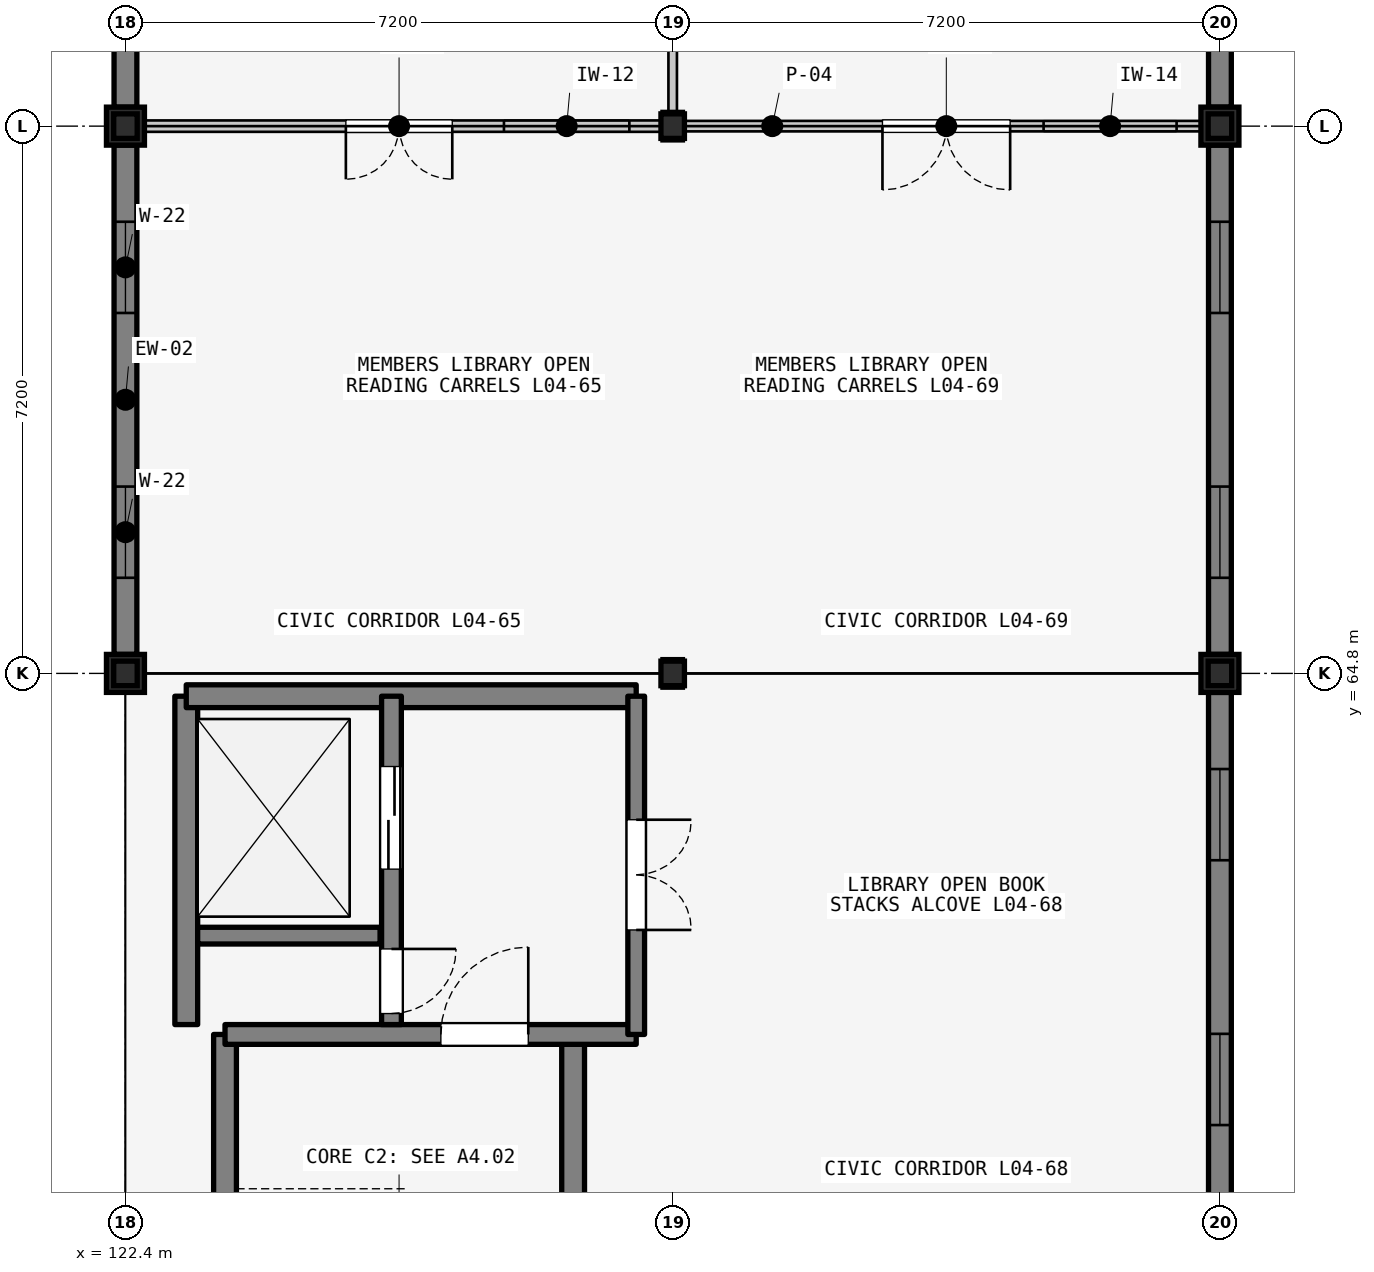
"""IFC4 building model, lengths in metres.
Left out: names, types, materials, properties, quantities, classifications, styles, units other than length and angle.
Written with IfcOpenShell. Run it as: python <this file> out.ifc"""

import sys

from ifc_helpers import new_model, si_unit, direction, frame, frame_2d, origin, origin_2d, place, context, subcontext, project, spatial, rectangle, i_section, extrude, element, fill, save


model = new_model("IFC4")
c1 = context("Model", 3, precision=1e-05, world=origin(), true_north=direction((0.0, 1.0)))
c2 = subcontext(c1, "Body", "Model", "MODEL_VIEW")
j1 = project(units=[si_unit("LENGTHUNIT", "METRE"), si_unit("PLANEANGLEUNIT", "RADIAN")], contexts=[c1])
p1 = place(None, origin())
s1 = spatial("IfcSite", under=j1, at=p1, CompositionType="ELEMENT")
p2 = place(p1, origin())
s2 = spatial("IfcBuilding", under=s1, at=p2, CompositionType="ELEMENT")
p3 = place(p2, frame((0.0, 0.0, 14.1)))
s3 = spatial("IfcBuildingStorey", under=s2, at=p3, CompositionType="ELEMENT", Elevation=14.1)
for number, where, z_axis, x_axis in (
    (1, (122.4, 64.8, 0.0), (0.0, 0.0, 1.0), (1.0, 0.0, 0.0)),
    (2, (122.4, 72.0, 0.0), (0.0, 0.0, 1.0), (1.0, 0.0, 0.0)),
):
    element("IfcColumn", number, at=place(p3, frame(where, z_axis=z_axis, x_axis=x_axis)), inside=s3, PredefinedType="COLUMN", context=c2, shape_type="SweptSolid", body=[
        extrude(rectangle(XDim=0.5, YDim=0.5, at=origin_2d()), origin(), (0.0, 0.0, 1.0), 3.9),
    ])
for number, where, z_axis, x_axis in (
    (3, (129.6, 64.8, 0.0), (0.0, 0.0, 1.0), (1.0, 0.0, 0.0)),
    (4, (129.6, 72.0, 0.0), (0.0, 0.0, 1.0), (1.0, 0.0, 0.0)),
):
    element("IfcColumn", number, at=place(p3, frame(where, z_axis=z_axis, x_axis=x_axis)), inside=s3, PredefinedType="COLUMN", context=c2, shape_type="SweptSolid", body=[
        extrude(i_section(OverallWidth=0.257, OverallDepth=0.363, WebThickness=0.013, FlangeThickness=0.022, FilletRadius=0.015, at=origin_2d()), origin(), (0.0, 0.0, 1.0), 3.9),
    ])
for number, where, z_axis, x_axis in (
    (5, (136.8, 64.8, 0.0), (0.0, 0.0, 1.0), (1.0, 0.0, 0.0)),
    (6, (136.8, 72.0, 0.0), (0.0, 0.0, 1.0), (1.0, 0.0, 0.0)),
):
    element("IfcColumn", number, at=place(p3, frame(where, z_axis=z_axis, x_axis=x_axis)), inside=s3, PredefinedType="COLUMN", context=c2, shape_type="SweptSolid", body=[
        extrude(rectangle(XDim=0.5, YDim=0.5, at=origin_2d()), origin(), (0.0, 0.0, 1.0), 3.9),
    ])
for number, where, z_axis, x_axis in (
    (7, (122.4, 64.8, 3.9), (0.0, 0.0, 1.0), (1.0, 0.0, 0.0)),
    (8, (129.6, 64.8, 3.9), (0.0, 0.0, 1.0), (1.0, 0.0, 0.0)),
    (9, (136.8, 64.8, 3.9), (0.0, 0.0, 1.0), (1.0, 0.0, 0.0)),
    (10, (122.4, 72.0, 3.9), (0.0, 0.0, 1.0), (1.0, 0.0, 0.0)),
    (11, (129.6, 72.0, 3.9), (0.0, 0.0, 1.0), (1.0, 0.0, 0.0)),
    (12, (136.8, 72.0, 3.9), (0.0, 0.0, 1.0), (1.0, 0.0, 0.0)),
):
    element("IfcColumn", number, at=place(p3, frame(where, z_axis=z_axis, x_axis=x_axis)), inside=s3, PredefinedType="COLUMN", context=c2, shape_type="SweptSolid", body=[
        extrude(i_section(OverallWidth=0.309, OverallDepth=0.323, WebThickness=0.014, FlangeThickness=0.023, FilletRadius=0.015, at=origin_2d()), origin(), (0.0, 0.0, 1.0), 2.22),
    ])
p4 = place(p3, frame((122.4, 65.05, 0.0), z_axis=(0.0, 0.0, 1.0), x_axis=(0.0, 1.0, 0.0)))
e13 = element("IfcWall", 13, at=p4, inside=s3, PredefinedType="SOLIDWALL", context=c2, shape_type="SweptSolid", body=[
    extrude(rectangle(XDim=6.7, YDim=0.3, at=frame_2d((3.35, 0.0))), origin(), (0.0, 0.0, 1.0), 3.2),
])
p5 = place(p4, frame((1.008, 0.0, 0.95)))
e14 = element("IfcOpeningElement", 14, at=p5, cuts=e13, PredefinedType="OPENING", context=c2, shape_type="SweptSolid", body=[
    extrude(rectangle(XDim=1.2, YDim=1.7, at=frame_2d((0.6, 0.85))), frame((0.0, 0.16, 0.0), z_axis=(0.0, -1.0, 0.0), x_axis=(1.0, 0.0, 0.0)), (0.0, 0.0, 1.0), 0.32),
])
p6 = place(p4, frame((4.492, 0.0, 0.95)))
e15 = element("IfcOpeningElement", 15, at=p6, cuts=e13, PredefinedType="OPENING", context=c2, shape_type="SweptSolid", body=[
    extrude(rectangle(XDim=1.2, YDim=1.7, at=frame_2d((0.6, 0.85))), frame((0.0, 0.16, 0.0), z_axis=(0.0, -1.0, 0.0), x_axis=(1.0, 0.0, 0.0)), (0.0, 0.0, 1.0), 0.32),
])
p7 = place(p3, frame((122.4, 72.25, 0.0), z_axis=(0.0, 0.0, 1.0), x_axis=(0.0, 1.0, 0.0)))
e16 = element("IfcWall", 16, at=p7, inside=s3, PredefinedType="SOLIDWALL", context=c2, shape_type="SweptSolid", body=[
    extrude(rectangle(XDim=6.7, YDim=0.3, at=frame_2d((3.35, 0.0))), origin(), (0.0, 0.0, 1.0), 3.2),
])
p8 = place(p7, frame((1.008, 0.0, 0.95)))
e17 = element("IfcOpeningElement", 17, at=p8, cuts=e16, PredefinedType="OPENING", context=c2, shape_type="SweptSolid", body=[
    extrude(rectangle(XDim=1.2, YDim=1.7, at=frame_2d((0.6, 0.85))), frame((0.0, 0.16, 0.0), z_axis=(0.0, -1.0, 0.0), x_axis=(1.0, 0.0, 0.0)), (0.0, 0.0, 1.0), 0.32),
])
p9 = place(p7, frame((4.492, 0.0, 0.95)))
e18 = element("IfcOpeningElement", 18, at=p9, cuts=e16, PredefinedType="OPENING", context=c2, shape_type="SweptSolid", body=[
    extrude(rectangle(XDim=1.2, YDim=1.7, at=frame_2d((0.6, 0.85))), frame((0.0, 0.16, 0.0), z_axis=(0.0, -1.0, 0.0), x_axis=(1.0, 0.0, 0.0)), (0.0, 0.0, 1.0), 0.32),
])
p10 = place(p3, frame((136.8, 64.55, 0.0), z_axis=(0.0, 0.0, 1.0), x_axis=(0.0, -1.0, 0.0)))
e19 = element("IfcWall", 19, at=p10, inside=s3, PredefinedType="SOLIDWALL", context=c2, shape_type="SweptSolid", body=[
    extrude(rectangle(XDim=6.7, YDim=0.3, at=frame_2d((3.35, 0.0))), origin(), (0.0, 0.0, 1.0), 3.2),
])
p11 = place(p10, frame((1.008, 0.0, 0.95)))
e20 = element("IfcOpeningElement", 20, at=p11, cuts=e19, PredefinedType="OPENING", context=c2, shape_type="SweptSolid", body=[
    extrude(rectangle(XDim=1.2, YDim=1.7, at=frame_2d((0.6, 0.85))), frame((0.0, 0.16, 0.0), z_axis=(0.0, -1.0, 0.0), x_axis=(1.0, 0.0, 0.0)), (0.0, 0.0, 1.0), 0.32),
])
p12 = place(p10, frame((4.492, 0.0, 0.95)))
e21 = element("IfcOpeningElement", 21, at=p12, cuts=e19, PredefinedType="OPENING", context=c2, shape_type="SweptSolid", body=[
    extrude(rectangle(XDim=1.2, YDim=1.7, at=frame_2d((0.6, 0.85))), frame((0.0, 0.16, 0.0), z_axis=(0.0, -1.0, 0.0), x_axis=(1.0, 0.0, 0.0)), (0.0, 0.0, 1.0), 0.32),
])
p13 = place(p3, frame((136.8, 71.75, 0.0), z_axis=(0.0, 0.0, 1.0), x_axis=(0.0, -1.0, 0.0)))
e22 = element("IfcWall", 22, at=p13, inside=s3, PredefinedType="SOLIDWALL", context=c2, shape_type="SweptSolid", body=[
    extrude(rectangle(XDim=6.7, YDim=0.3, at=frame_2d((3.35, 0.0))), origin(), (0.0, 0.0, 1.0), 3.2),
])
p14 = place(p13, frame((1.008, 0.0, 0.95)))
e23 = element("IfcOpeningElement", 23, at=p14, cuts=e22, PredefinedType="OPENING", context=c2, shape_type="SweptSolid", body=[
    extrude(rectangle(XDim=1.2, YDim=1.7, at=frame_2d((0.6, 0.85))), frame((0.0, 0.16, 0.0), z_axis=(0.0, -1.0, 0.0), x_axis=(1.0, 0.0, 0.0)), (0.0, 0.0, 1.0), 0.32),
])
p15 = place(p13, frame((4.492, 0.0, 0.95)))
e24 = element("IfcOpeningElement", 24, at=p15, cuts=e22, PredefinedType="OPENING", context=c2, shape_type="SweptSolid", body=[
    extrude(rectangle(XDim=1.2, YDim=1.7, at=frame_2d((0.6, 0.85))), frame((0.0, 0.16, 0.0), z_axis=(0.0, -1.0, 0.0), x_axis=(1.0, 0.0, 0.0)), (0.0, 0.0, 1.0), 0.32),
])
p16 = place(p3, frame((136.8, 78.95, 0.0), z_axis=(0.0, 0.0, 1.0), x_axis=(0.0, -1.0, 0.0)))
e25 = element("IfcWall", 25, at=p16, inside=s3, PredefinedType="SOLIDWALL", context=c2, shape_type="SweptSolid", body=[
    extrude(rectangle(XDim=6.7, YDim=0.3, at=frame_2d((3.35, 0.0))), origin(), (0.0, 0.0, 1.0), 3.2),
])
p17 = place(p16, frame((1.008, 0.0, 0.95)))
e26 = element("IfcOpeningElement", 26, at=p17, cuts=e25, PredefinedType="OPENING", context=c2, shape_type="SweptSolid", body=[
    extrude(rectangle(XDim=1.2, YDim=1.7, at=frame_2d((0.6, 0.85))), frame((0.0, 0.16, 0.0), z_axis=(0.0, -1.0, 0.0), x_axis=(1.0, 0.0, 0.0)), (0.0, 0.0, 1.0), 0.32),
])
p18 = place(p16, frame((4.492, 0.0, 0.95)))
e27 = element("IfcOpeningElement", 27, at=p18, cuts=e25, PredefinedType="OPENING", context=c2, shape_type="SweptSolid", body=[
    extrude(rectangle(XDim=1.2, YDim=1.7, at=frame_2d((0.6, 0.85))), frame((0.0, 0.16, 0.0), z_axis=(0.0, -1.0, 0.0), x_axis=(1.0, 0.0, 0.0)), (0.0, 0.0, 1.0), 0.32),
])
for number, where, z_axis, x_axis in (
    (28, (123.71, 50.75, 0.0), (0.0, 0.0, 1.0), (0.0, 1.0, 0.0)),
    (29, (128.29, 50.75, 0.0), (0.0, 0.0, 1.0), (0.0, 1.0, 0.0)),
):
    element("IfcWall", number, at=place(p3, frame(where, z_axis=z_axis, x_axis=x_axis)), inside=s3, PredefinedType="SHEAR", context=c2, shape_type="SweptSolid", body=[
        extrude(rectangle(XDim=9.3, YDim=0.3, at=frame_2d((4.65, 0.0))), origin(), (0.0, 0.0, 1.0), 3.72),
    ])
p19 = place(p3, frame((123.71, 60.05, 0.0), z_axis=(0.0, 0.0, 1.0), x_axis=(1.0, 0.0, 0.0)))
e30 = element("IfcWall", 30, at=p19, inside=s3, PredefinedType="SHEAR", context=c2, shape_type="SweptSolid", body=[
    extrude(rectangle(XDim=5.41, YDim=0.26, at=frame_2d((2.705, 0.0))), origin(), (0.0, 0.0, 1.0), 3.72),
])
p20 = place(p19, frame((2.84, 0.0, 0.0)))
e31 = element("IfcOpeningElement", 31, at=p20, cuts=e30, PredefinedType="OPENING", context=c2, shape_type="SweptSolid", body=[
    extrude(rectangle(XDim=1.15, YDim=2.15, at=frame_2d((0.575, 1.075))), frame((0.0, 0.14, 0.0), z_axis=(0.0, -1.0, 0.0), x_axis=(1.0, 0.0, 0.0)), (0.0, 0.0, 1.0), 0.28),
])
p21 = place(p3, frame((123.2, 60.18, 0.0), z_axis=(0.0, 0.0, 1.0), x_axis=(0.0, 1.0, 0.0)))
e32 = element("IfcWall", 32, at=p21, inside=s3, PredefinedType="SHEAR", context=c2, shape_type="SweptSolid", body=[
    extrude(rectangle(XDim=4.32, YDim=0.3, at=frame_2d((2.16, 0.0))), origin(), (0.0, 0.0, 1.0), 3.72),
])
p22 = place(p3, frame((123.2, 64.5, 0.0), z_axis=(0.0, 0.0, 1.0), x_axis=(1.0, 0.0, 0.0)))
e33 = element("IfcWall", 33, at=p22, inside=s3, PredefinedType="SHEAR", context=c2, shape_type="SweptSolid", body=[
    extrude(rectangle(XDim=5.92, YDim=0.3, at=frame_2d((2.96, 0.0))), origin(), (0.0, 0.0, 1.0), 3.72),
])
p23 = place(p3, frame((123.35, 61.35, 0.0), z_axis=(0.0, 0.0, 1.0), x_axis=(1.0, 0.0, 0.0)))
e34 = element("IfcWall", 34, at=p23, inside=s3, PredefinedType="SHEAR", context=c2, shape_type="SweptSolid", body=[
    extrude(rectangle(XDim=2.4, YDim=0.22, at=frame_2d((1.2, 0.0))), origin(), (0.0, 0.0, 1.0), 3.72),
])
p24 = place(p3, frame((125.9, 64.5, 0.0), z_axis=(0.0, 0.0, 1.0), x_axis=(0.0, -1.0, 0.0)))
e35 = element("IfcWall", 35, at=p24, inside=s3, PredefinedType="SHEAR", context=c2, shape_type="SweptSolid", body=[
    extrude(rectangle(XDim=4.32, YDim=0.26, at=frame_2d((2.16, 0.0))), origin(), (0.0, 0.0, 1.0), 3.72),
])
p25 = place(p24, frame((0.925, 0.0, 0.0)))
e36 = element("IfcOpeningElement", 36, at=p25, cuts=e35, PredefinedType="OPENING", context=c2, shape_type="SweptSolid", body=[
    extrude(rectangle(XDim=1.35, YDim=2.2, at=frame_2d((0.675, 1.1))), frame((0.0, 0.14, 0.0), z_axis=(0.0, -1.0, 0.0), x_axis=(1.0, 0.0, 0.0)), (0.0, 0.0, 1.0), 0.28),
])
p26 = place(p24, frame((3.325, 0.0, 0.0)))
e37 = element("IfcOpeningElement", 37, at=p26, cuts=e35, PredefinedType="OPENING", context=c2, shape_type="SweptSolid", body=[
    extrude(rectangle(XDim=0.85, YDim=2.05, at=frame_2d((0.425, 1.025))), frame((0.0, 0.14, 0.0), z_axis=(0.0, -1.0, 0.0), x_axis=(1.0, 0.0, 0.0)), (0.0, 0.0, 1.0), 0.28),
])
p27 = place(p3, frame((129.12, 64.5, 0.0), z_axis=(0.0, 0.0, 1.0), x_axis=(0.0, -1.0, 0.0)))
e38 = element("IfcWall", 38, at=p27, inside=s3, PredefinedType="SHEAR", context=c2, shape_type="SweptSolid", body=[
    extrude(rectangle(XDim=4.45, YDim=0.22, at=frame_2d((2.225, 0.0))), origin(), (0.0, 0.0, 1.0), 3.72),
])
p28 = place(p27, frame((1.625, 0.0, 0.0)))
e39 = element("IfcOpeningElement", 39, at=p28, cuts=e38, PredefinedType="OPENING", context=c2, shape_type="SweptSolid", body=[
    extrude(rectangle(XDim=1.45, YDim=2.2, at=frame_2d((0.725, 1.1))), frame((0.0, 0.12, 0.0), z_axis=(0.0, -1.0, 0.0), x_axis=(1.0, 0.0, 0.0)), (0.0, 0.0, 1.0), 0.24),
])
p29 = place(p3, frame((129.48, 72.0, 0.0), z_axis=(0.0, 0.0, 1.0), x_axis=(-1.0, 0.0, 0.0)))
e40 = element("IfcWall", 40, at=p29, inside=s3, PredefinedType="PARTITIONING", context=c2, shape_type="SweptSolid", body=[
    extrude(rectangle(XDim=6.96, YDim=0.15, at=frame_2d((3.48, 0.0))), origin(), (0.0, 0.0, 1.0), 3.19),
])
p30 = place(p29, frame((2.78, 0.0, 0.0)))
e41 = element("IfcOpeningElement", 41, at=p30, cuts=e40, PredefinedType="OPENING", context=c2, shape_type="SweptSolid", body=[
    extrude(rectangle(XDim=1.4, YDim=2.25, at=frame_2d((0.7, 1.125))), frame((0.0, 0.085, 0.0), z_axis=(0.0, -1.0, 0.0), x_axis=(1.0, 0.0, 0.0)), (0.0, 0.0, 1.0), 0.17),
])
p31 = place(p29, frame((0.45, 0.0, 1.05)))
e42 = element("IfcOpeningElement", 42, at=p31, cuts=e40, PredefinedType="OPENING", context=c2, shape_type="SweptSolid", body=[
    extrude(rectangle(XDim=1.65, YDim=1.15, at=frame_2d((0.825, 0.575))), frame((0.0, 0.085, 0.0), z_axis=(0.0, -1.0, 0.0), x_axis=(1.0, 0.0, 0.0)), (0.0, 0.0, 1.0), 0.17),
])
p32 = place(p3, frame((129.6, 79.08, 0.0), z_axis=(0.0, 0.0, 1.0), x_axis=(0.0, -1.0, 0.0)))
e43 = element("IfcWall", 43, at=p32, inside=s3, PredefinedType="PARTITIONING", context=c2, shape_type="SweptSolid", body=[
    extrude(rectangle(XDim=6.96, YDim=0.112, at=frame_2d((3.48, 0.0))), origin(), (0.0, 0.0, 1.0), 3.19),
])
p33 = place(p3, frame((136.68, 72.0, 0.0), z_axis=(0.0, 0.0, 1.0), x_axis=(-1.0, 0.0, 0.0)))
e44 = element("IfcWall", 44, at=p33, inside=s3, PredefinedType="PARTITIONING", context=c2, shape_type="SweptSolid", body=[
    extrude(rectangle(XDim=6.96, YDim=0.138, at=frame_2d((3.48, 0.0))), origin(), (0.0, 0.0, 1.0), 3.19),
])
p34 = place(p33, frame((2.64, 0.0, 0.0)))
e45 = element("IfcOpeningElement", 45, at=p34, cuts=e44, PredefinedType="OPENING", context=c2, shape_type="SweptSolid", body=[
    extrude(rectangle(XDim=1.68, YDim=2.35, at=frame_2d((0.84, 1.175))), frame((0.0, 0.079, 0.0), z_axis=(0.0, -1.0, 0.0), x_axis=(1.0, 0.0, 0.0)), (0.0, 0.0, 1.0), 0.158),
])
p35 = place(p33, frame((0.45, 0.0, 1.05)))
e46 = element("IfcOpeningElement", 46, at=p35, cuts=e44, PredefinedType="OPENING", context=c2, shape_type="SweptSolid", body=[
    extrude(rectangle(XDim=1.75, YDim=1.18, at=frame_2d((0.875, 0.59))), frame((0.0, 0.079, 0.0), z_axis=(0.0, -1.0, 0.0), x_axis=(1.0, 0.0, 0.0)), (0.0, 0.0, 1.0), 0.158),
])
p36 = place(p5, origin())
e47 = element("IfcWindow", 47, at=p36, inside=s3, PartitioningType="SINGLE_PANEL", PredefinedType="WINDOW", context=c2, shape_type="SweptSolid", body=[
    extrude(rectangle(XDim=1.2, YDim=1.7, at=frame_2d((0.6, 0.85))), frame((0.0, 0.03, 0.0), z_axis=(0.0, -1.0, 0.0), x_axis=(1.0, 0.0, 0.0)), (0.0, 0.0, 1.0), 0.06),
])
fill(e14, e47)
p37 = place(p6, origin())
e48 = element("IfcWindow", 48, at=p37, inside=s3, PartitioningType="SINGLE_PANEL", PredefinedType="WINDOW", context=c2, shape_type="SweptSolid", body=[
    extrude(rectangle(XDim=1.2, YDim=1.7, at=frame_2d((0.6, 0.85))), frame((0.0, 0.03, 0.0), z_axis=(0.0, -1.0, 0.0), x_axis=(1.0, 0.0, 0.0)), (0.0, 0.0, 1.0), 0.06),
])
fill(e15, e48)
p38 = place(p11, origin())
e49 = element("IfcWindow", 49, at=p38, inside=s3, PartitioningType="SINGLE_PANEL", PredefinedType="WINDOW", context=c2, shape_type="SweptSolid", body=[
    extrude(rectangle(XDim=1.2, YDim=1.7, at=frame_2d((0.6, 0.85))), frame((0.0, 0.03, 0.0), z_axis=(0.0, -1.0, 0.0), x_axis=(1.0, 0.0, 0.0)), (0.0, 0.0, 1.0), 0.06),
])
fill(e20, e49)
p39 = place(p12, origin())
e50 = element("IfcWindow", 50, at=p39, inside=s3, PartitioningType="SINGLE_PANEL", PredefinedType="WINDOW", context=c2, shape_type="SweptSolid", body=[
    extrude(rectangle(XDim=1.2, YDim=1.7, at=frame_2d((0.6, 0.85))), frame((0.0, 0.03, 0.0), z_axis=(0.0, -1.0, 0.0), x_axis=(1.0, 0.0, 0.0)), (0.0, 0.0, 1.0), 0.06),
])
fill(e21, e50)
p40 = place(p14, origin())
e51 = element("IfcWindow", 51, at=p40, inside=s3, PartitioningType="SINGLE_PANEL", PredefinedType="WINDOW", context=c2, shape_type="SweptSolid", body=[
    extrude(rectangle(XDim=1.2, YDim=1.7, at=frame_2d((0.6, 0.85))), frame((0.0, 0.03, 0.0), z_axis=(0.0, -1.0, 0.0), x_axis=(1.0, 0.0, 0.0)), (0.0, 0.0, 1.0), 0.06),
])
fill(e23, e51)
p41 = place(p15, origin())
e52 = element("IfcWindow", 52, at=p41, inside=s3, PartitioningType="SINGLE_PANEL", PredefinedType="WINDOW", context=c2, shape_type="SweptSolid", body=[
    extrude(rectangle(XDim=1.2, YDim=1.7, at=frame_2d((0.6, 0.85))), frame((0.0, 0.03, 0.0), z_axis=(0.0, -1.0, 0.0), x_axis=(1.0, 0.0, 0.0)), (0.0, 0.0, 1.0), 0.06),
])
fill(e24, e52)
p42 = place(p20, origin())
e53 = element("IfcDoor", 53, at=p42, inside=s3, OperationType="SINGLE_SWING_RIGHT", PredefinedType="DOOR", context=c2, shape_type="SweptSolid", body=[
    extrude(rectangle(XDim=1.15, YDim=2.15, at=frame_2d((0.575, 1.075))), frame((0.0, 0.025, 0.0), z_axis=(0.0, -1.0, 0.0), x_axis=(1.0, 0.0, 0.0)), (0.0, 0.0, 1.0), 0.05),
])
fill(e31, e53)
p43 = place(p25, origin())
e54 = element("IfcDoor", 54, at=p43, inside=s3, OperationType="DOUBLE_DOOR_SLIDING", PredefinedType="DOOR", context=c2, shape_type="SweptSolid", body=[
    extrude(rectangle(XDim=1.35, YDim=2.2, at=frame_2d((0.675, 1.1))), frame((0.0, 0.025, 0.0), z_axis=(0.0, -1.0, 0.0), x_axis=(1.0, 0.0, 0.0)), (0.0, 0.0, 1.0), 0.05),
])
fill(e36, e54)
p44 = place(p26, origin())
e55 = element("IfcDoor", 55, at=p44, inside=s3, OperationType="SINGLE_SWING_LEFT", PredefinedType="DOOR", context=c2, shape_type="SweptSolid", body=[
    extrude(rectangle(XDim=0.85, YDim=2.05, at=frame_2d((0.425, 1.025))), frame((0.0, 0.025, 0.0), z_axis=(0.0, -1.0, 0.0), x_axis=(1.0, 0.0, 0.0)), (0.0, 0.0, 1.0), 0.05),
])
fill(e37, e55)
p45 = place(p28, origin())
e56 = element("IfcDoor", 56, at=p45, inside=s3, OperationType="DOUBLE_DOOR_SINGLE_SWING", PredefinedType="DOOR", context=c2, shape_type="SweptSolid", body=[
    extrude(rectangle(XDim=1.45, YDim=2.2, at=frame_2d((0.725, 1.1))), frame((0.0, 0.025, 0.0), z_axis=(0.0, -1.0, 0.0), x_axis=(1.0, 0.0, 0.0)), (0.0, 0.0, 1.0), 0.05),
])
fill(e39, e56)
p46 = place(p30, origin())
e57 = element("IfcDoor", 57, at=p46, inside=s3, OperationType="DOUBLE_DOOR_SINGLE_SWING", PredefinedType="DOOR", context=c2, shape_type="SweptSolid", body=[
    extrude(rectangle(XDim=1.4, YDim=2.25, at=frame_2d((0.7, 1.125))), frame((0.0, 0.025, 0.0), z_axis=(0.0, -1.0, 0.0), x_axis=(1.0, 0.0, 0.0)), (0.0, 0.0, 1.0), 0.05),
])
fill(e41, e57)
p47 = place(p31, origin())
e58 = element("IfcWindow", 58, at=p47, inside=s3, PartitioningType="SINGLE_PANEL", PredefinedType="WINDOW", context=c2, shape_type="SweptSolid", body=[
    extrude(rectangle(XDim=1.65, YDim=1.15, at=frame_2d((0.825, 0.575))), frame((0.0, 0.03, 0.0), z_axis=(0.0, -1.0, 0.0), x_axis=(1.0, 0.0, 0.0)), (0.0, 0.0, 1.0), 0.06),
])
fill(e42, e58)
p48 = place(p34, origin())
e59 = element("IfcDoor", 59, at=p48, inside=s3, OperationType="DOUBLE_DOOR_SINGLE_SWING", PredefinedType="DOOR", context=c2, shape_type="SweptSolid", body=[
    extrude(rectangle(XDim=1.68, YDim=2.35, at=frame_2d((0.84, 1.175))), frame((0.0, 0.025, 0.0), z_axis=(0.0, -1.0, 0.0), x_axis=(1.0, 0.0, 0.0)), (0.0, 0.0, 1.0), 0.05),
])
fill(e45, e59)
p49 = place(p35, origin())
e60 = element("IfcWindow", 60, at=p49, inside=s3, PartitioningType="SINGLE_PANEL", PredefinedType="WINDOW", context=c2, shape_type="SweptSolid", body=[
    extrude(rectangle(XDim=1.75, YDim=1.18, at=frame_2d((0.875, 0.59))), frame((0.0, 0.03, 0.0), z_axis=(0.0, -1.0, 0.0), x_axis=(1.0, 0.0, 0.0)), (0.0, 0.0, 1.0), 0.06),
])
fill(e46, e60)
save(model, sys.argv[1])
